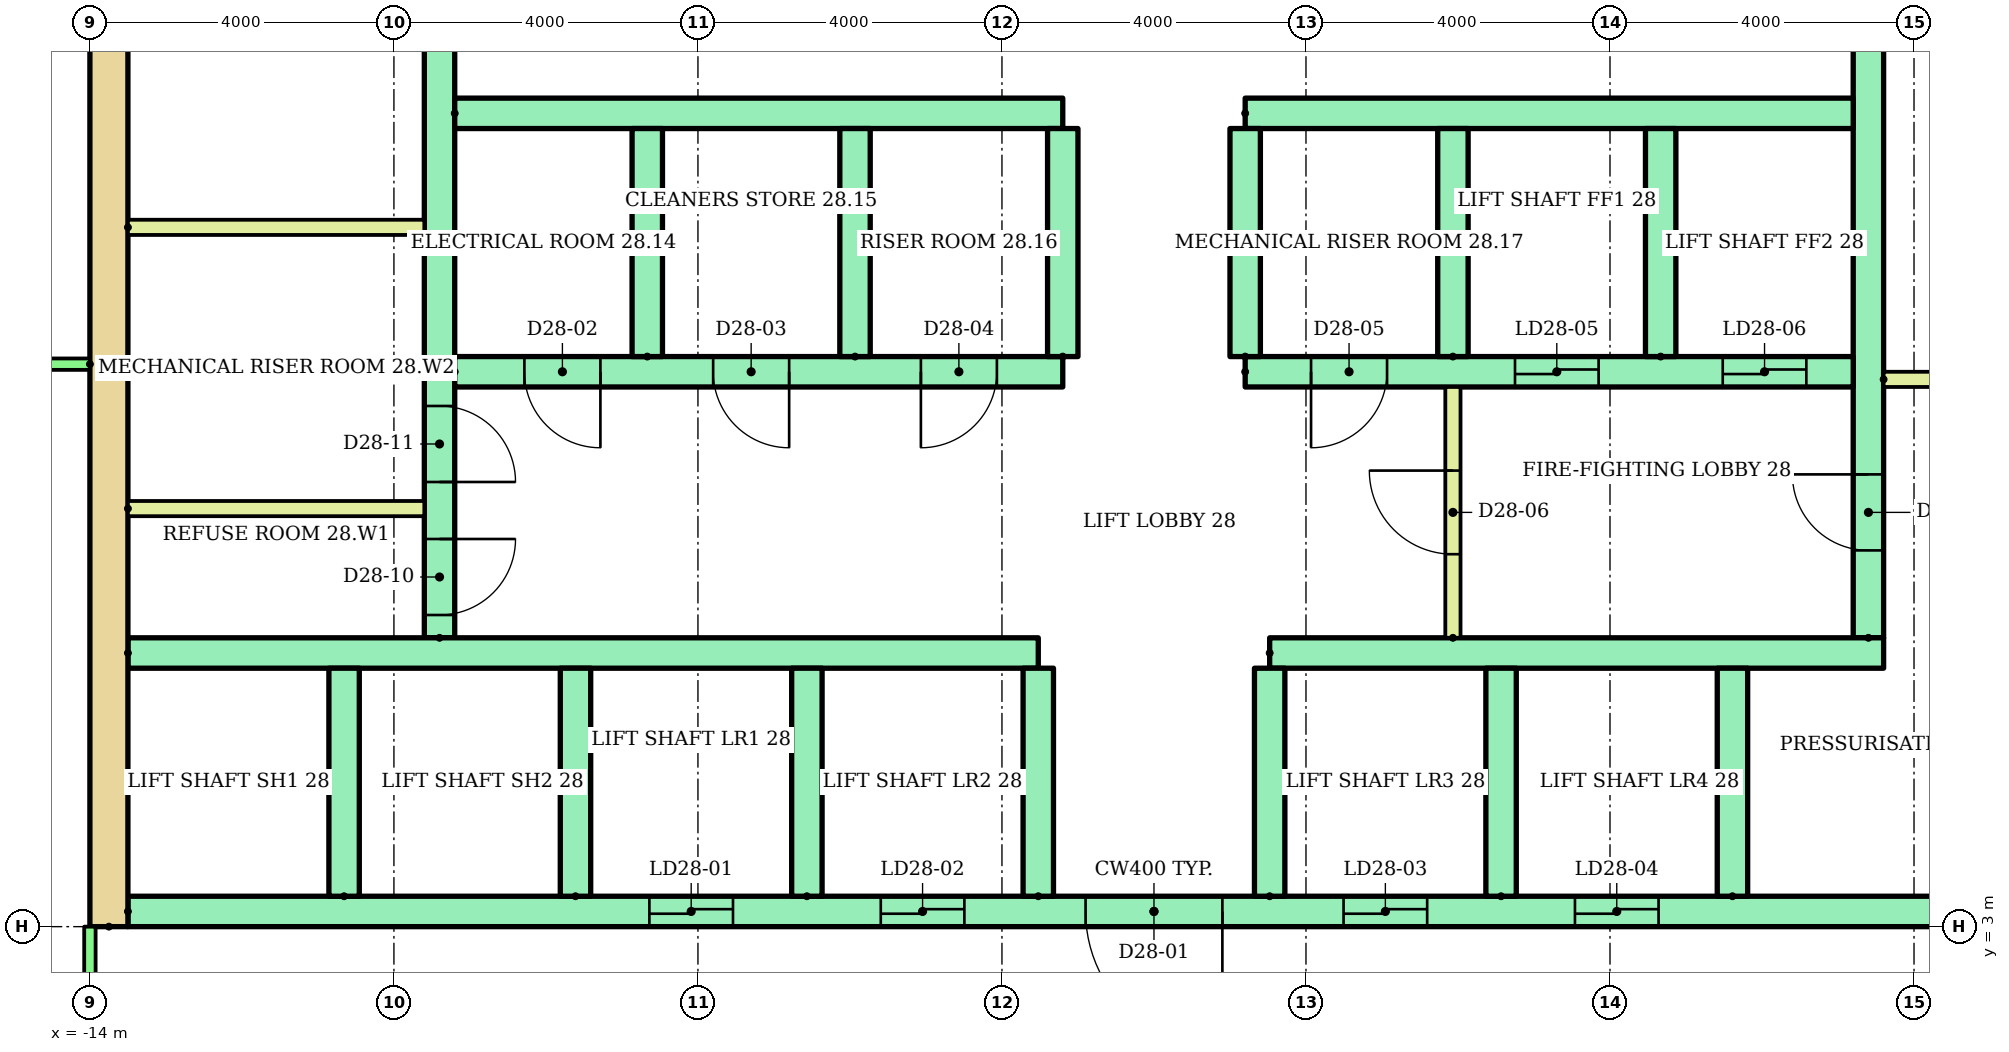
"""IFC4 building model, lengths in metres.
Left out: names, types, materials, properties, quantities, classifications, styles, units other than length and angle.
Written with IfcOpenShell. Run it as: python <this file> out.ifc"""

import sys

from ifc_helpers import new_model, si_unit, direction, frame, frame_2d, origin, place, context, subcontext, project, spatial, rectangle, extrude, element, fill, save


model = new_model("IFC4")
c1 = context("Model", 3, precision=1e-05, world=origin(), true_north=direction((0.0, 1.0)))
c2 = subcontext(c1, "Body", "Model", "MODEL_VIEW")
j1 = project(units=[si_unit("LENGTHUNIT", "METRE"), si_unit("PLANEANGLEUNIT", "RADIAN")], contexts=[c1])
p1 = place(None, origin())
s1 = spatial("IfcSite", under=j1, at=p1, CompositionType="ELEMENT")
p2 = place(p1, origin())
s2 = spatial("IfcBuilding", under=s1, at=p2, CompositionType="ELEMENT")
p3 = place(p2, frame((0.0, 0.0, 106.3)))
s3 = spatial("IfcBuildingStorey", under=s2, at=p3, CompositionType="ELEMENT", Elevation=106.3)
p4 = place(p3, frame((-13.75, 3.0, 0.0), z_axis=(0.0, 0.0, 1.0), x_axis=(0.0, 1.0, 0.0)))
e1 = element("IfcWall", 1, at=p4, inside=s3, PredefinedType="SHEAR", context=c2, shape_type="SweptSolid", body=[
    extrude(rectangle(XDim=17.0, YDim=0.5, at=frame_2d((8.5, 0.0))), origin(), (0.0, 0.0, 1.0), 8.8),
])
p5 = place(p3, frame((-9.4, 6.8, 0.0), z_axis=(0.0, 0.0, 1.0), x_axis=(0.0, 1.0, 0.0)))
e2 = element("IfcWall", 2, at=p5, inside=s3, PredefinedType="SHEAR", context=c2, shape_type="SweptSolid", body=[
    extrude(rectangle(XDim=12.7, YDim=0.4, at=frame_2d((6.35, 0.0))), origin(), (0.0, 0.0, 1.0), 8.8),
])
p6 = place(p5, frame((0.3, 0.0, 0.0)))
e3 = element("IfcOpeningElement", 3, at=p6, cuts=e2, PredefinedType="OPENING", context=c2, shape_type="SweptSolid", body=[
    extrude(rectangle(XDim=1.0, YDim=2.1, at=frame_2d((0.5, 1.05))), frame((0.0, 0.21, 0.0), z_axis=(0.0, -1.0, 0.0), x_axis=(1.0, 0.0, 0.0)), (0.0, 0.0, 1.0), 0.42),
])
p7 = place(p5, frame((2.05, 0.0, 0.0)))
e4 = element("IfcOpeningElement", 4, at=p7, cuts=e2, PredefinedType="OPENING", context=c2, shape_type="SweptSolid", body=[
    extrude(rectangle(XDim=1.0, YDim=2.1, at=frame_2d((0.5, 1.05))), frame((0.0, 0.21, 0.0), z_axis=(0.0, -1.0, 0.0), x_axis=(1.0, 0.0, 0.0)), (0.0, 0.0, 1.0), 0.42),
])
p8 = place(p5, frame((7.925, 0.0, 0.0)))
e5 = element("IfcOpeningElement", 5, at=p8, cuts=e2, PredefinedType="OPENING", context=c2, shape_type="SweptSolid", body=[
    extrude(rectangle(XDim=1.0, YDim=2.1, at=frame_2d((0.5, 1.05))), frame((0.0, 0.21, 0.0), z_axis=(0.0, -1.0, 0.0), x_axis=(1.0, 0.0, 0.0)), (0.0, 0.0, 1.0), 0.42),
])
p9 = place(p3, frame((9.4, 6.8, 0.0), z_axis=(0.0, 0.0, 1.0), x_axis=(0.0, 1.0, 0.0)))
e6 = element("IfcWall", 6, at=p9, inside=s3, PredefinedType="SHEAR", context=c2, shape_type="SweptSolid", body=[
    extrude(rectangle(XDim=12.7, YDim=0.4, at=frame_2d((6.35, 0.0))), origin(), (0.0, 0.0, 1.0), 8.8),
])
p10 = place(p9, frame((1.15, 0.0, 0.0)))
e7 = element("IfcOpeningElement", 7, at=p10, cuts=e6, PredefinedType="OPENING", context=c2, shape_type="SweptSolid", body=[
    extrude(rectangle(XDim=1.0, YDim=2.1, at=frame_2d((0.5, 1.05))), frame((0.0, 0.21, 0.0), z_axis=(0.0, -1.0, 0.0), x_axis=(1.0, 0.0, 0.0)), (0.0, 0.0, 1.0), 0.42),
])
p11 = place(p9, frame((7.925, 0.0, 0.0)))
e8 = element("IfcOpeningElement", 8, at=p11, cuts=e6, PredefinedType="OPENING", context=c2, shape_type="SweptSolid", body=[
    extrude(rectangle(XDim=1.0, YDim=2.1, at=frame_2d((0.5, 1.05))), frame((0.0, 0.21, 0.0), z_axis=(0.0, -1.0, 0.0), x_axis=(1.0, 0.0, 0.0)), (0.0, 0.0, 1.0), 0.42),
])
p12 = place(p3, frame((-13.5, 3.2, 0.0)))
e9 = element("IfcWall", 9, at=p12, inside=s3, PredefinedType="SHEAR", context=c2, shape_type="SweptSolid", body=[
    extrude(rectangle(XDim=27.0, YDim=0.4, at=frame_2d((13.5, 0.0))), origin(), (0.0, 0.0, 1.0), 8.8),
])
p13 = place(p12, frame((6.861, 0.0, 0.0)))
e10 = element("IfcOpeningElement", 10, at=p13, cuts=e9, PredefinedType="OPENING", context=c2, shape_type="SweptSolid", body=[
    extrude(rectangle(XDim=1.1, YDim=2.1, at=frame_2d((0.55, 1.05))), frame((0.0, 0.21, 0.0), z_axis=(0.0, -1.0, 0.0), x_axis=(1.0, 0.0, 0.0)), (0.0, 0.0, 1.0), 0.42),
])
p14 = place(p12, frame((9.906, 0.0, 0.0)))
e11 = element("IfcOpeningElement", 11, at=p14, cuts=e9, PredefinedType="OPENING", context=c2, shape_type="SweptSolid", body=[
    extrude(rectangle(XDim=1.1, YDim=2.1, at=frame_2d((0.55, 1.05))), frame((0.0, 0.21, 0.0), z_axis=(0.0, -1.0, 0.0), x_axis=(1.0, 0.0, 0.0)), (0.0, 0.0, 1.0), 0.42),
])
p15 = place(p12, frame((15.994, 0.0, 0.0)))
e12 = element("IfcOpeningElement", 12, at=p15, cuts=e9, PredefinedType="OPENING", context=c2, shape_type="SweptSolid", body=[
    extrude(rectangle(XDim=1.1, YDim=2.1, at=frame_2d((0.55, 1.05))), frame((0.0, 0.21, 0.0), z_axis=(0.0, -1.0, 0.0), x_axis=(1.0, 0.0, 0.0)), (0.0, 0.0, 1.0), 0.42),
])
p16 = place(p12, frame((19.039, 0.0, 0.0)))
e13 = element("IfcOpeningElement", 13, at=p16, cuts=e9, PredefinedType="OPENING", context=c2, shape_type="SweptSolid", body=[
    extrude(rectangle(XDim=1.1, YDim=2.1, at=frame_2d((0.55, 1.05))), frame((0.0, 0.21, 0.0), z_axis=(0.0, -1.0, 0.0), x_axis=(1.0, 0.0, 0.0)), (0.0, 0.0, 1.0), 0.42),
])
p17 = place(p12, frame((12.6, 0.0, 0.0)))
e14 = element("IfcOpeningElement", 14, at=p17, cuts=e9, PredefinedType="OPENING", context=c2, shape_type="SweptSolid", body=[
    extrude(rectangle(XDim=1.8, YDim=2.1, at=frame_2d((0.9, 1.05))), frame((0.0, 0.21, 0.0), z_axis=(0.0, -1.0, 0.0), x_axis=(1.0, 0.0, 0.0)), (0.0, 0.0, 1.0), 0.42),
])
p18 = place(p3, frame((-13.5, 6.6, 0.0)))
e15 = element("IfcWall", 15, at=p18, inside=s3, PredefinedType="SHEAR", context=c2, shape_type="SweptSolid", body=[
    extrude(rectangle(XDim=11.978, YDim=0.4, at=frame_2d((5.989, 0.0))), origin(), (0.0, 0.0, 1.0), 8.8),
])
p19 = place(p3, frame((1.522, 6.6, 0.0)))
e16 = element("IfcWall", 16, at=p19, inside=s3, PredefinedType="SHEAR", context=c2, shape_type="SweptSolid", body=[
    extrude(rectangle(XDim=8.078, YDim=0.4, at=frame_2d((4.039, 0.0))), origin(), (0.0, 0.0, 1.0), 8.8),
])
for number, where, z_axis, x_axis in (
    (17, (-10.656, 3.4, 0.0), (0.0, 0.0, 1.0), (0.0, 1.0, 0.0)),
    (18, (-7.611, 3.4, 0.0), (0.0, 0.0, 1.0), (0.0, 1.0, 0.0)),
    (19, (-4.567, 3.4, 0.0), (0.0, 0.0, 1.0), (0.0, 1.0, 0.0)),
    (20, (-1.522, 3.4, 0.0), (0.0, 0.0, 1.0), (0.0, 1.0, 0.0)),
    (21, (1.522, 3.4, 0.0), (0.0, 0.0, 1.0), (0.0, 1.0, 0.0)),
    (22, (4.567, 3.4, 0.0), (0.0, 0.0, 1.0), (0.0, 1.0, 0.0)),
    (23, (7.611, 3.4, 0.0), (0.0, 0.0, 1.0), (0.0, 1.0, 0.0)),
):
    element("IfcWall", number, at=place(p3, frame(where, z_axis=z_axis, x_axis=x_axis)), inside=s3, PredefinedType="SHEAR", context=c2, shape_type="SweptSolid", body=[
        extrude(rectangle(XDim=3.0, YDim=0.4, at=frame_2d((1.5, 0.0))), origin(), (0.0, 0.0, 1.0), 8.8),
    ])
p20 = place(p3, frame((-9.2, 10.3, 0.0)))
e24 = element("IfcWall", 24, at=p20, inside=s3, PredefinedType="SHEAR", context=c2, shape_type="SweptSolid", body=[
    extrude(rectangle(XDim=8.0, YDim=0.4, at=frame_2d((4.0, 0.0))), origin(), (0.0, 0.0, 1.0), 8.8),
])
p21 = place(p20, frame((0.917, 0.0, 0.0)))
e25 = element("IfcOpeningElement", 25, at=p21, cuts=e24, PredefinedType="OPENING", context=c2, shape_type="SweptSolid", body=[
    extrude(rectangle(XDim=1.0, YDim=2.1, at=frame_2d((0.5, 1.05))), frame((0.0, 0.21, 0.0), z_axis=(0.0, -1.0, 0.0), x_axis=(1.0, 0.0, 0.0)), (0.0, 0.0, 1.0), 0.42),
])
p22 = place(p20, frame((3.4, 0.0, 0.0)))
e26 = element("IfcOpeningElement", 26, at=p22, cuts=e24, PredefinedType="OPENING", context=c2, shape_type="SweptSolid", body=[
    extrude(rectangle(XDim=1.0, YDim=2.1, at=frame_2d((0.5, 1.05))), frame((0.0, 0.21, 0.0), z_axis=(0.0, -1.0, 0.0), x_axis=(1.0, 0.0, 0.0)), (0.0, 0.0, 1.0), 0.42),
])
p23 = place(p20, frame((6.133, 0.0, 0.0)))
e27 = element("IfcOpeningElement", 27, at=p23, cuts=e24, PredefinedType="OPENING", context=c2, shape_type="SweptSolid", body=[
    extrude(rectangle(XDim=1.0, YDim=2.1, at=frame_2d((0.5, 1.05))), frame((0.0, 0.21, 0.0), z_axis=(0.0, -1.0, 0.0), x_axis=(1.0, 0.0, 0.0)), (0.0, 0.0, 1.0), 0.42),
])
p24 = place(p3, frame((-9.2, 13.7, 0.0)))
e28 = element("IfcWall", 28, at=p24, inside=s3, PredefinedType="SHEAR", context=c2, shape_type="SweptSolid", body=[
    extrude(rectangle(XDim=8.0, YDim=0.4, at=frame_2d((4.0, 0.0))), origin(), (0.0, 0.0, 1.0), 8.8),
])
p25 = place(p3, frame((1.2, 10.3, 0.0)))
e29 = element("IfcWall", 29, at=p25, inside=s3, PredefinedType="SHEAR", context=c2, shape_type="SweptSolid", body=[
    extrude(rectangle(XDim=8.0, YDim=0.4, at=frame_2d((4.0, 0.0))), origin(), (0.0, 0.0, 1.0), 8.8),
])
p26 = place(p25, frame((3.55, 0.0, 0.0)))
e30 = element("IfcOpeningElement", 30, at=p26, cuts=e29, PredefinedType="OPENING", context=c2, shape_type="SweptSolid", body=[
    extrude(rectangle(XDim=1.1, YDim=2.1, at=frame_2d((0.55, 1.05))), frame((0.0, 0.21, 0.0), z_axis=(0.0, -1.0, 0.0), x_axis=(1.0, 0.0, 0.0)), (0.0, 0.0, 1.0), 0.42),
])
p27 = place(p25, frame((6.283, 0.0, 0.0)))
e31 = element("IfcOpeningElement", 31, at=p27, cuts=e29, PredefinedType="OPENING", context=c2, shape_type="SweptSolid", body=[
    extrude(rectangle(XDim=1.1, YDim=2.1, at=frame_2d((0.55, 1.05))), frame((0.0, 0.21, 0.0), z_axis=(0.0, -1.0, 0.0), x_axis=(1.0, 0.0, 0.0)), (0.0, 0.0, 1.0), 0.42),
])
p28 = place(p25, frame((0.867, 0.0, 0.0)))
e32 = element("IfcOpeningElement", 32, at=p28, cuts=e29, PredefinedType="OPENING", context=c2, shape_type="SweptSolid", body=[
    extrude(rectangle(XDim=1.0, YDim=2.1, at=frame_2d((0.5, 1.05))), frame((0.0, 0.21, 0.0), z_axis=(0.0, -1.0, 0.0), x_axis=(1.0, 0.0, 0.0)), (0.0, 0.0, 1.0), 0.42),
])
p29 = place(p3, frame((1.2, 13.7, 0.0)))
e33 = element("IfcWall", 33, at=p29, inside=s3, PredefinedType="SHEAR", context=c2, shape_type="SweptSolid", body=[
    extrude(rectangle(XDim=8.0, YDim=0.4, at=frame_2d((4.0, 0.0))), origin(), (0.0, 0.0, 1.0), 8.8),
])
for number, where, z_axis, x_axis in (
    (34, (-6.667, 10.5, 0.0), (0.0, 0.0, 1.0), (0.0, 1.0, 0.0)),
    (35, (-3.933, 10.5, 0.0), (0.0, 0.0, 1.0), (0.0, 1.0, 0.0)),
    (36, (-1.2, 10.5, 0.0), (0.0, 0.0, 1.0), (0.0, 1.0, 0.0)),
    (37, (1.2, 10.5, 0.0), (0.0, 0.0, 1.0), (0.0, 1.0, 0.0)),
    (38, (3.933, 10.5, 0.0), (0.0, 0.0, 1.0), (0.0, 1.0, 0.0)),
    (39, (6.667, 10.5, 0.0), (0.0, 0.0, 1.0), (0.0, 1.0, 0.0)),
):
    element("IfcWall", number, at=place(p3, frame(where, z_axis=z_axis, x_axis=x_axis)), inside=s3, PredefinedType="SHEAR", context=c2, shape_type="SweptSolid", body=[
        extrude(rectangle(XDim=3.0, YDim=0.4, at=frame_2d((1.5, 0.0))), origin(), (0.0, 0.0, 1.0), 8.8),
    ])
p30 = place(p3, frame((3.933, 6.8, 0.0), z_axis=(0.0, 0.0, 1.0), x_axis=(0.0, 1.0, 0.0)))
e40 = element("IfcWall", 40, at=p30, inside=s3, PredefinedType="PARTITIONING", context=c2, shape_type="SweptSolid", body=[
    extrude(rectangle(XDim=3.3, YDim=0.2, at=frame_2d((1.65, 0.0))), origin(), (0.0, 0.0, 1.0), 8.8),
])
p31 = place(p30, frame((1.1, 0.0, 0.0)))
e41 = element("IfcOpeningElement", 41, at=p31, cuts=e40, PredefinedType="OPENING", context=c2, shape_type="SweptSolid", body=[
    extrude(rectangle(XDim=1.1, YDim=2.1, at=frame_2d((0.55, 1.05))), frame((0.0, 0.11, 0.0), z_axis=(0.0, -1.0, 0.0), x_axis=(1.0, 0.0, 0.0)), (0.0, 0.0, 1.0), 0.22),
])
for number, where in (
    (42, (-13.5, 8.5, 0.0)),
    (43, (-13.5, 12.2, 0.0)),
    (44, (9.6, 10.2, 0.0)),
):
    element("IfcWall", number, at=place(p3, frame(where)), inside=s3, PredefinedType="PARTITIONING", context=c2, shape_type="SweptSolid", body=[
        extrude(rectangle(XDim=3.9, YDim=0.2, at=frame_2d((1.95, 0.0))), origin(), (0.0, 0.0, 1.0), 8.8),
    ])
p32 = place(p3, frame((-14.0, 10.4, 0.0), z_axis=(0.0, 0.0, 1.0), x_axis=(-1.0, 0.0, 0.0)))
e45 = element("IfcWall", 45, at=p32, inside=s3, PredefinedType="PARTITIONING", context=c2, shape_type="SweptSolid", body=[
    extrude(rectangle(XDim=8.0, YDim=0.15, at=frame_2d((4.0, 0.0))), origin(), (0.0, 0.0, 1.0), 8.8),
])
p33 = place(p3, frame((-14.0, 1.4, 0.0), z_axis=(0.0, 0.0, 1.0), x_axis=(0.0, 1.0, 0.0)))
e46 = element("IfcWall", 46, at=p33, inside=s3, PredefinedType="PARTITIONING", context=c2, shape_type="SweptSolid", body=[
    extrude(rectangle(XDim=1.6, YDim=0.15, at=frame_2d((0.8, 0.0))), origin(), (0.0, 0.0, 1.0), 8.8),
])
p34 = place(p13, origin())
e47 = element("IfcDoor", 47, at=p34, inside=s3, OperationType="SLIDING_TO_LEFT", PredefinedType="DOOR", context=c2, shape_type="SweptSolid", body=[
    extrude(rectangle(XDim=1.1, YDim=2.1, at=frame_2d((0.55, 1.05))), frame((0.0, 0.025, 0.0), z_axis=(0.0, -1.0, 0.0), x_axis=(1.0, 0.0, 0.0)), (0.0, 0.0, 1.0), 0.05),
])
fill(e10, e47)
p35 = place(p14, origin())
e48 = element("IfcDoor", 48, at=p35, inside=s3, OperationType="SLIDING_TO_LEFT", PredefinedType="DOOR", context=c2, shape_type="SweptSolid", body=[
    extrude(rectangle(XDim=1.1, YDim=2.1, at=frame_2d((0.55, 1.05))), frame((0.0, 0.025, 0.0), z_axis=(0.0, -1.0, 0.0), x_axis=(1.0, 0.0, 0.0)), (0.0, 0.0, 1.0), 0.05),
])
fill(e11, e48)
p36 = place(p15, origin())
e49 = element("IfcDoor", 49, at=p36, inside=s3, OperationType="SLIDING_TO_LEFT", PredefinedType="DOOR", context=c2, shape_type="SweptSolid", body=[
    extrude(rectangle(XDim=1.1, YDim=2.1, at=frame_2d((0.55, 1.05))), frame((0.0, 0.025, 0.0), z_axis=(0.0, -1.0, 0.0), x_axis=(1.0, 0.0, 0.0)), (0.0, 0.0, 1.0), 0.05),
])
fill(e12, e49)
p37 = place(p16, origin())
e50 = element("IfcDoor", 50, at=p37, inside=s3, OperationType="SLIDING_TO_LEFT", PredefinedType="DOOR", context=c2, shape_type="SweptSolid", body=[
    extrude(rectangle(XDim=1.1, YDim=2.1, at=frame_2d((0.55, 1.05))), frame((0.0, 0.025, 0.0), z_axis=(0.0, -1.0, 0.0), x_axis=(1.0, 0.0, 0.0)), (0.0, 0.0, 1.0), 0.05),
])
fill(e13, e50)
p38 = place(p17, frame((1.8, 0.0, 0.0), z_axis=(0.0, 0.0, 1.0), x_axis=(-1.0, 0.0, 0.0)))
e51 = element("IfcDoor", 51, at=p38, inside=s3, OperationType="DOUBLE_DOOR_SINGLE_SWING", PredefinedType="DOOR", context=c2, shape_type="SweptSolid", body=[
    extrude(rectangle(XDim=1.8, YDim=2.1, at=frame_2d((0.9, 1.05))), frame((0.0, 0.025, 0.0), z_axis=(0.0, -1.0, 0.0), x_axis=(1.0, 0.0, 0.0)), (0.0, 0.0, 1.0), 0.05),
])
fill(e14, e51)
p39 = place(p26, origin())
e52 = element("IfcDoor", 52, at=p39, inside=s3, OperationType="SLIDING_TO_LEFT", PredefinedType="DOOR", context=c2, shape_type="SweptSolid", body=[
    extrude(rectangle(XDim=1.1, YDim=2.1, at=frame_2d((0.55, 1.05))), frame((0.0, 0.025, 0.0), z_axis=(0.0, -1.0, 0.0), x_axis=(1.0, 0.0, 0.0)), (0.0, 0.0, 1.0), 0.05),
])
fill(e30, e52)
p40 = place(p27, origin())
e53 = element("IfcDoor", 53, at=p40, inside=s3, OperationType="SLIDING_TO_LEFT", PredefinedType="DOOR", context=c2, shape_type="SweptSolid", body=[
    extrude(rectangle(XDim=1.1, YDim=2.1, at=frame_2d((0.55, 1.05))), frame((0.0, 0.025, 0.0), z_axis=(0.0, -1.0, 0.0), x_axis=(1.0, 0.0, 0.0)), (0.0, 0.0, 1.0), 0.05),
])
fill(e31, e53)
p41 = place(p21, frame((1.0, 0.0, 0.0), z_axis=(0.0, 0.0, 1.0), x_axis=(-1.0, 0.0, 0.0)))
e54 = element("IfcDoor", 54, at=p41, inside=s3, OperationType="SINGLE_SWING_RIGHT", PredefinedType="DOOR", context=c2, shape_type="SweptSolid", body=[
    extrude(rectangle(XDim=1.0, YDim=2.1, at=frame_2d((0.5, 1.05))), frame((0.0, 0.025, 0.0), z_axis=(0.0, -1.0, 0.0), x_axis=(1.0, 0.0, 0.0)), (0.0, 0.0, 1.0), 0.05),
])
fill(e25, e54)
p42 = place(p22, frame((1.0, 0.0, 0.0), z_axis=(0.0, 0.0, 1.0), x_axis=(-1.0, 0.0, 0.0)))
e55 = element("IfcDoor", 55, at=p42, inside=s3, OperationType="SINGLE_SWING_RIGHT", PredefinedType="DOOR", context=c2, shape_type="SweptSolid", body=[
    extrude(rectangle(XDim=1.0, YDim=2.1, at=frame_2d((0.5, 1.05))), frame((0.0, 0.025, 0.0), z_axis=(0.0, -1.0, 0.0), x_axis=(1.0, 0.0, 0.0)), (0.0, 0.0, 1.0), 0.05),
])
fill(e26, e55)
p43 = place(p23, frame((1.0, 0.0, 0.0), z_axis=(0.0, 0.0, 1.0), x_axis=(-1.0, 0.0, 0.0)))
e56 = element("IfcDoor", 56, at=p43, inside=s3, OperationType="SINGLE_SWING_LEFT", PredefinedType="DOOR", context=c2, shape_type="SweptSolid", body=[
    extrude(rectangle(XDim=1.0, YDim=2.1, at=frame_2d((0.5, 1.05))), frame((0.0, 0.025, 0.0), z_axis=(0.0, -1.0, 0.0), x_axis=(1.0, 0.0, 0.0)), (0.0, 0.0, 1.0), 0.05),
])
fill(e27, e56)
p44 = place(p28, frame((1.0, 0.0, 0.0), z_axis=(0.0, 0.0, 1.0), x_axis=(-1.0, 0.0, 0.0)))
e57 = element("IfcDoor", 57, at=p44, inside=s3, OperationType="SINGLE_SWING_LEFT", PredefinedType="DOOR", context=c2, shape_type="SweptSolid", body=[
    extrude(rectangle(XDim=1.0, YDim=2.1, at=frame_2d((0.5, 1.05))), frame((0.0, 0.025, 0.0), z_axis=(0.0, -1.0, 0.0), x_axis=(1.0, 0.0, 0.0)), (0.0, 0.0, 1.0), 0.05),
])
fill(e32, e57)
p45 = place(p31, origin())
e58 = element("IfcDoor", 58, at=p45, inside=s3, OperationType="SINGLE_SWING_RIGHT", PredefinedType="DOOR", context=c2, shape_type="SweptSolid", body=[
    extrude(rectangle(XDim=1.1, YDim=2.1, at=frame_2d((0.55, 1.05))), frame((0.0, 0.025, 0.0), z_axis=(0.0, -1.0, 0.0), x_axis=(1.0, 0.0, 0.0)), (0.0, 0.0, 1.0), 0.05),
])
fill(e41, e58)
p46 = place(p6, frame((1.0, 0.0, 0.0), z_axis=(0.0, 0.0, 1.0), x_axis=(-1.0, 0.0, 0.0)))
e59 = element("IfcDoor", 59, at=p46, inside=s3, OperationType="SINGLE_SWING_RIGHT", PredefinedType="DOOR", context=c2, shape_type="SweptSolid", body=[
    extrude(rectangle(XDim=1.0, YDim=2.1, at=frame_2d((0.5, 1.05))), frame((0.0, 0.025, 0.0), z_axis=(0.0, -1.0, 0.0), x_axis=(1.0, 0.0, 0.0)), (0.0, 0.0, 1.0), 0.05),
])
fill(e3, e59)
p47 = place(p7, frame((1.0, 0.0, 0.0), z_axis=(0.0, 0.0, 1.0), x_axis=(-1.0, 0.0, 0.0)))
e60 = element("IfcDoor", 60, at=p47, inside=s3, OperationType="SINGLE_SWING_LEFT", PredefinedType="DOOR", context=c2, shape_type="SweptSolid", body=[
    extrude(rectangle(XDim=1.0, YDim=2.1, at=frame_2d((0.5, 1.05))), frame((0.0, 0.025, 0.0), z_axis=(0.0, -1.0, 0.0), x_axis=(1.0, 0.0, 0.0)), (0.0, 0.0, 1.0), 0.05),
])
fill(e4, e60)
p48 = place(p10, origin())
e61 = element("IfcDoor", 61, at=p48, inside=s3, OperationType="SINGLE_SWING_RIGHT", PredefinedType="DOOR", context=c2, shape_type="SweptSolid", body=[
    extrude(rectangle(XDim=1.0, YDim=2.1, at=frame_2d((0.5, 1.05))), frame((0.0, 0.025, 0.0), z_axis=(0.0, -1.0, 0.0), x_axis=(1.0, 0.0, 0.0)), (0.0, 0.0, 1.0), 0.05),
])
fill(e7, e61)
save(model, sys.argv[1])
